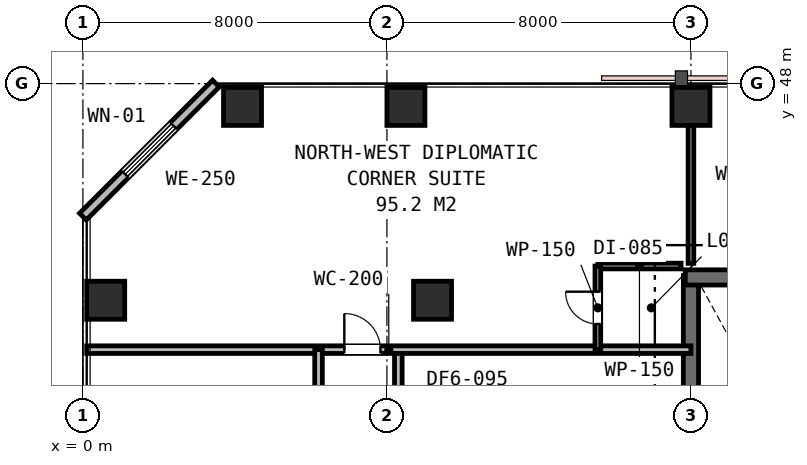
"""IFC4 building model, lengths in metres.
Left out: names, types, materials, properties, quantities, classifications, styles, units other than length and angle.
Written with IfcOpenShell. Run it as: python <this file> out.ifc"""

import sys

from ifc_helpers import new_model, si_unit, direction, frame, frame_2d, origin, origin_2d, place, context, subcontext, project, spatial, rectangle, extrude, element, fill, save


model = new_model("IFC4")
c1 = context("Model", 3, precision=1e-05, world=origin(), true_north=direction((0.0, 1.0)))
c2 = subcontext(c1, "Body", "Model", "MODEL_VIEW")
j1 = project(units=[si_unit("LENGTHUNIT", "METRE"), si_unit("PLANEANGLEUNIT", "RADIAN")], contexts=[c1])
p1 = place(None, origin())
s1 = spatial("IfcSite", under=j1, at=p1, CompositionType="ELEMENT")
p2 = place(p1, origin())
s2 = spatial("IfcBuilding", under=s1, at=p2, CompositionType="ELEMENT")
p3 = place(p2, frame((0.0, 0.0, 40.2)))
s3 = spatial("IfcBuildingStorey", under=s2, at=p3, CompositionType="ELEMENT", Elevation=40.2)
p4 = place(p3, frame((16.0, 30.65, 0.0), z_axis=(0.0, 0.0, 1.0), x_axis=(0.0, 1.0, 0.0)))
e1 = element("IfcWall", 1, at=p4, inside=s3, PredefinedType="SHEAR", context=c2, shape_type="SweptSolid", body=[
    extrude(rectangle(XDim=12.3, YDim=0.4, at=frame_2d((6.15, 0.0))), origin(), (0.0, 0.0, 1.0), 3.6),
])
p5 = place(p3, frame((15.85, 42.9, 0.0), z_axis=(0.0, 0.0, 1.0), x_axis=(1.0, 0.0, 0.0)))
e2 = element("IfcWall", 2, at=p5, inside=s3, PredefinedType="SHEAR", context=c2, shape_type="SweptSolid", body=[
    extrude(rectangle(XDim=24.3, YDim=0.4, at=frame_2d((12.15, 0.0))), origin(), (0.0, 0.0, 1.0), 3.6),
])
for number, where, z_axis, x_axis in (
    (3, (9.2, 42.3, 0.0), (0.0, 0.0, 1.0), (1.0, 0.0, 0.0)),
    (4, (0.6, 42.3, 0.0), (0.0, 0.0, 1.0), (1.0, 0.0, 0.0)),
    (5, (4.2, 47.4, 0.0), (0.0, 0.0, 1.0), (1.0, 0.0, 0.0)),
    (6, (8.5, 47.4, 0.0), (0.0, 0.0, 1.0), (1.0, 0.0, 0.0)),
    (7, (16.0, 47.4, 0.0), (0.0, 0.0, 1.0), (1.0, 0.0, 0.0)),
):
    element("IfcColumn", number, at=place(p3, frame(where, z_axis=z_axis, x_axis=x_axis)), inside=s3, PredefinedType="COLUMN", context=c2, shape_type="SweptSolid", body=[
        extrude(rectangle(XDim=1.0, YDim=1.0, at=origin_2d()), origin(), (0.0, 0.0, 1.0), 3.6),
    ])
p6 = place(p3, frame((3.5, 48.0, 0.0), z_axis=(0.0, 0.0, 1.0), x_axis=(-0.707106781187, -0.707106781187, 0.0)))
e8 = element("IfcWall", 8, at=p6, inside=s3, PredefinedType="STANDARD", context=c2, shape_type="SweptSolid", body=[
    extrude(rectangle(XDim=4.95, YDim=0.25, at=frame_2d((2.475, 0.0))), origin(), (0.0, 0.0, 1.0), 3.33),
])
p7 = place(p6, frame((1.575, 0.0, 0.75)))
e9 = element("IfcOpeningElement", 9, at=p7, cuts=e8, PredefinedType="OPENING", context=c2, shape_type="SweptSolid", body=[
    extrude(rectangle(XDim=1.8, YDim=1.85, at=frame_2d((0.9, 0.925))), frame((0.0, 0.135, 0.0), z_axis=(0.0, -1.0, 0.0), x_axis=(1.0, 0.0, 0.0)), (0.0, 0.0, 1.0), 0.27),
])
p8 = place(p3, frame((8.3, 30.8, 0.0), z_axis=(0.0, 0.0, 1.0), x_axis=(0.0, 1.0, 0.0)))
e10 = element("IfcWall", 10, at=p8, inside=s3, PredefinedType="PARTITIONING", context=c2, shape_type="SweptSolid", body=[
    extrude(rectangle(XDim=10.2, YDim=0.2, at=frame_2d((5.1, 0.0))), origin(), (0.0, 0.0, 1.0), 2.82),
])
p9 = place(p8, frame((1.95, 0.0, 0.0)))
e11 = element("IfcOpeningElement", 11, at=p9, cuts=e10, PredefinedType="OPENING", context=c2, shape_type="SweptSolid", body=[
    extrude(rectangle(XDim=0.9, YDim=2.15, at=frame_2d((0.45, 1.075))), frame((0.0, 0.11, 0.0), z_axis=(0.0, -1.0, 0.0), x_axis=(1.0, 0.0, 0.0)), (0.0, 0.0, 1.0), 0.22),
])
p10 = place(p8, frame((7.025, 0.0, 0.0)))
e12 = element("IfcOpeningElement", 12, at=p10, cuts=e10, PredefinedType="OPENING", context=c2, shape_type="SweptSolid", body=[
    extrude(rectangle(XDim=0.95, YDim=2.15, at=frame_2d((0.475, 1.075))), frame((0.0, 0.11, 0.0), z_axis=(0.0, -1.0, 0.0), x_axis=(1.0, 0.0, 0.0)), (0.0, 0.0, 1.0), 0.22),
])
p11 = place(p3, frame((0.1, 41.0, 0.0), z_axis=(0.0, 0.0, 1.0), x_axis=(1.0, 0.0, 0.0)))
e13 = element("IfcWall", 13, at=p11, inside=s3, PredefinedType="PARTITIONING", context=c2, shape_type="SweptSolid", body=[
    extrude(rectangle(XDim=15.9, YDim=0.2, at=frame_2d((7.95, 0.0))), origin(), (0.0, 0.0, 1.0), 2.82),
])
p12 = place(p11, frame((6.779, 0.0, 0.0)))
e14 = element("IfcOpeningElement", 14, at=p12, cuts=e13, PredefinedType="OPENING", context=c2, shape_type="SweptSolid", body=[
    extrude(rectangle(XDim=0.95, YDim=2.15, at=frame_2d((0.475, 1.075))), frame((0.0, 0.11, 0.0), z_axis=(0.0, -1.0, 0.0), x_axis=(1.0, 0.0, 0.0)), (0.0, 0.0, 1.0), 0.22),
])
p13 = place(p3, frame((13.55, 43.2, 0.0), z_axis=(0.0, 0.0, 1.0), x_axis=(1.0, 0.0, 0.0)))
e15 = element("IfcWall", 15, at=p13, inside=s3, PredefinedType="PARTITIONING", context=c2, shape_type="SweptSolid", body=[
    extrude(rectangle(XDim=2.19, YDim=0.15, at=frame_2d((1.095, 0.0))), origin(), (0.0, 0.0, 1.0), 3.33),
])
p14 = place(p3, frame((13.55, 41.0, 0.0), z_axis=(0.0, 0.0, 1.0), x_axis=(0.0, 1.0, 0.0)))
e16 = element("IfcWall", 16, at=p14, inside=s3, PredefinedType="PARTITIONING", context=c2, shape_type="SweptSolid", body=[
    extrude(rectangle(XDim=2.2, YDim=0.15, at=frame_2d((1.1, 0.0))), origin(), (0.0, 0.0, 1.0), 3.33),
])
p15 = place(p14, frame((0.675, 0.0, 0.0)))
e17 = element("IfcOpeningElement", 17, at=p15, cuts=e16, PredefinedType="OPENING", context=c2, shape_type="SweptSolid", body=[
    extrude(rectangle(XDim=0.85, YDim=2.15, at=frame_2d((0.425, 1.075))), frame((0.0, 0.085, 0.0), z_axis=(0.0, -1.0, 0.0), x_axis=(1.0, 0.0, 0.0)), (0.0, 0.0, 1.0), 0.17),
])
p16 = place(p3, frame((6.2, 28.6, 0.0), z_axis=(0.0, 0.0, 1.0), x_axis=(0.0, 1.0, 0.0)))
e18 = element("IfcWall", 18, at=p16, inside=s3, PredefinedType="PARTITIONING", context=c2, shape_type="SweptSolid", body=[
    extrude(rectangle(XDim=12.4, YDim=0.2, at=frame_2d((6.2, 0.0))), origin(), (0.0, 0.0, 1.0), 2.82),
])
p17 = place(p16, frame((3.182, 0.0, 0.0)))
e19 = element("IfcOpeningElement", 19, at=p17, cuts=e18, PredefinedType="OPENING", context=c2, shape_type="SweptSolid", body=[
    extrude(rectangle(XDim=0.95, YDim=2.15, at=frame_2d((0.475, 1.075))), frame((0.0, 0.11, 0.0), z_axis=(0.0, -1.0, 0.0), x_axis=(1.0, 0.0, 0.0)), (0.0, 0.0, 1.0), 0.22),
])
p18 = place(p16, frame((6.075, 0.0, 0.0)))
e20 = element("IfcOpeningElement", 20, at=p18, cuts=e18, PredefinedType="OPENING", context=c2, shape_type="SweptSolid", body=[
    extrude(rectangle(XDim=0.95, YDim=2.15, at=frame_2d((0.475, 1.075))), frame((0.0, 0.11, 0.0), z_axis=(0.0, -1.0, 0.0), x_axis=(1.0, 0.0, 0.0)), (0.0, 0.0, 1.0), 0.22),
])
p19 = place(p16, frame((8.966, 0.0, 0.0)))
e21 = element("IfcOpeningElement", 21, at=p19, cuts=e18, PredefinedType="OPENING", context=c2, shape_type="SweptSolid", body=[
    extrude(rectangle(XDim=0.95, YDim=2.15, at=frame_2d((0.475, 1.075))), frame((0.0, 0.11, 0.0), z_axis=(0.0, -1.0, 0.0), x_axis=(1.0, 0.0, 0.0)), (0.0, 0.0, 1.0), 0.22),
])
p20 = place(p3, frame((16.0, 43.27, 0.0), z_axis=(0.0, 0.0, 1.0), x_axis=(0.0, 1.0, 0.0)))
e22 = element("IfcWall", 22, at=p20, inside=s3, PredefinedType="PARTITIONING", context=c2, shape_type="SweptSolid", body=[
    extrude(rectangle(XDim=4.63, YDim=0.15, at=frame_2d((2.315, 0.0))), origin(), (0.0, 0.0, 1.0), 2.93),
])
p21 = place(p7, origin())
e23 = element("IfcWindow", 23, at=p21, inside=s3, PartitioningType="SINGLE_PANEL", PredefinedType="WINDOW", context=c2, shape_type="SweptSolid", body=[
    extrude(rectangle(XDim=1.8, YDim=1.85, at=frame_2d((0.9, 0.925))), frame((0.0, 0.03, 0.0), z_axis=(0.0, -1.0, 0.0), x_axis=(1.0, 0.0, 0.0)), (0.0, 0.0, 1.0), 0.06),
])
fill(e9, e23)
p22 = place(p12, origin())
e24 = element("IfcDoor", 24, at=p22, inside=s3, OperationType="SINGLE_SWING_LEFT", PredefinedType="DOOR", context=c2, shape_type="SweptSolid", body=[
    extrude(rectangle(XDim=0.95, YDim=2.15, at=frame_2d((0.475, 1.075))), frame((0.0, 0.025, 0.0), z_axis=(0.0, -1.0, 0.0), x_axis=(1.0, 0.0, 0.0)), (0.0, 0.0, 1.0), 0.05),
])
fill(e14, e24)
p23 = place(p15, origin())
e25 = element("IfcDoor", 25, at=p23, inside=s3, OperationType="SINGLE_SWING_RIGHT", PredefinedType="DOOR", context=c2, shape_type="SweptSolid", body=[
    extrude(rectangle(XDim=0.85, YDim=2.15, at=frame_2d((0.425, 1.075))), frame((0.0, 0.025, 0.0), z_axis=(0.0, -1.0, 0.0), x_axis=(1.0, 0.0, 0.0)), (0.0, 0.0, 1.0), 0.05),
])
fill(e17, e25)
save(model, sys.argv[1])
